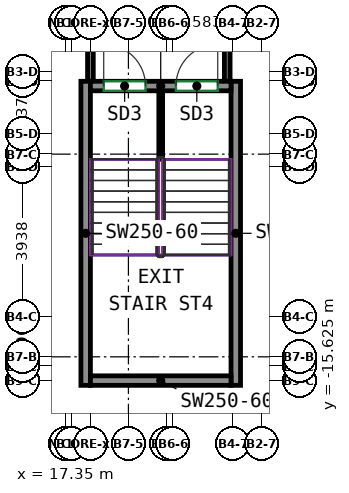
"""IFC4 building model, lengths in metres.
Left out: names, types, materials, properties, quantities, classifications, styles, units other than length and angle.
Written with IfcOpenShell. Run it as: python <this file> out.ifc"""

import sys

from ifc_helpers import new_model, si_unit, direction, frame, frame_2d, origin, place, context, subcontext, project, spatial, rectangle, extrude, source, transform, mapped, element, fill, save


model = new_model("IFC4")
c1 = context("Model", 3, precision=1e-05, world=origin(), true_north=direction((0.0, 1.0)))
c2 = subcontext(c1, "Body", "Model", "MODEL_VIEW")
j1 = project(units=[si_unit("LENGTHUNIT", "METRE"), si_unit("PLANEANGLEUNIT", "RADIAN")], contexts=[c1])
p1 = place(None, origin())
s1 = spatial("IfcSite", under=j1, at=p1, CompositionType="ELEMENT")
p2 = place(p1, origin())
s2 = spatial("IfcBuilding", under=s1, at=p2, CompositionType="ELEMENT")
p3 = place(p2, frame((0.0, 0.0, 223.7)))
s3 = spatial("IfcBuildingStorey", under=s2, at=p3, CompositionType="ELEMENT", Elevation=223.7)
m1 = source(origin(), c2, "Body", "SweptSolid", [
    extrude(rectangle(XDim=8.0, YDim=0.25, at=frame_2d((4.0, 0.0))), origin(), (0.0, 0.0, 1.0), 9.5),
])
for number, where, z_axis, x_axis in (
    (1, (17.875, -15.75, 0.0), (0.0, 0.0, 1.0), (0.0, 1.0, 0.0)),
    (2, (21.825, -15.75, 0.0), (0.0, 0.0, 1.0), (0.0, 1.0, 0.0)),
):
    element("IfcWall", number, at=place(p3, frame(where, z_axis=z_axis, x_axis=x_axis)), inside=s3, PredefinedType="SHEAR", context=c2, shape_type="MappedRepresentation", body=[
        mapped(m1, transform((0.0, 0.0, 0.0))),
    ])
m2 = source(origin(), c2, "Body", "SweptSolid", [
    extrude(rectangle(XDim=3.7, YDim=0.25, at=frame_2d((1.85, 0.0))), origin(), (0.0, 0.0, 1.0), 9.5),
])
p4 = place(p3, frame((18.0, -15.625, 0.0), z_axis=(0.0, 0.0, 1.0), x_axis=(1.0, 0.0, 0.0)))
e3 = element("IfcWall", 3, at=p4, inside=s3, PredefinedType="SHEAR", context=c2, shape_type="MappedRepresentation", body=[
    mapped(m2, transform((0.0, 0.0, 0.0))),
])
p5 = place(p3, frame((18.0, -7.875, 0.0), z_axis=(0.0, 0.0, 1.0), x_axis=(1.0, 0.0, 0.0)))
e4 = element("IfcWall", 4, at=p5, inside=s3, PredefinedType="SHEAR", context=c2, shape_type="MappedRepresentation", body=[
    mapped(m2, transform((0.0, 0.0, 0.0))),
])
p6 = place(p5, frame((2.25, 0.0, 0.0)))
e5 = element("IfcOpeningElement", 5, at=p6, cuts=e4, PredefinedType="OPENING", context=c2, shape_type="SweptSolid", body=[
    extrude(rectangle(XDim=1.1, YDim=2.1, at=frame_2d((0.55, 1.05))), frame((0.0, 0.135, 0.0), z_axis=(0.0, -1.0, 0.0), x_axis=(1.0, 0.0, 0.0)), (0.0, 0.0, 1.0), 0.27),
])
p7 = place(p5, frame((0.35, 0.0, 0.0)))
e6 = element("IfcOpeningElement", 6, at=p7, cuts=e4, PredefinedType="OPENING", context=c2, shape_type="SweptSolid", body=[
    extrude(rectangle(XDim=1.1, YDim=2.1, at=frame_2d((0.55, 1.05))), frame((0.0, 0.135, 0.0), z_axis=(0.0, -1.0, 0.0), x_axis=(1.0, 0.0, 0.0)), (0.0, 0.0, 1.0), 0.27),
])
m3 = source(origin(), c2, "Body", "SweptSolid", [
    extrude(rectangle(XDim=1.8, YDim=0.1, at=frame_2d((0.9, 0.0))), origin(), (0.0, 0.0, 1.0), 3.1),
])
p8 = place(p3, frame((19.85, -9.8, 0.0), z_axis=(0.0, 0.0, 1.0), x_axis=(0.0, 1.0, 0.0)))
e7 = element("IfcWall", 7, at=p8, inside=s3, PredefinedType="PARTITIONING", context=c2, shape_type="MappedRepresentation", body=[
    mapped(m3, transform((0.0, 0.0, 0.0))),
])
p9 = place(p3, frame((21.6, -7.75, 0.0), z_axis=(0.0, 0.0, 1.0), x_axis=(0.0, 1.0, 0.0)))
e8 = element("IfcWall", 8, at=p9, inside=s3, PredefinedType="PARTITIONING", context=c2, shape_type="SweptSolid", body=[
    extrude(rectangle(XDim=11.075, YDim=0.15, at=frame_2d((5.538, 0.0))), origin(), (0.0, 0.0, 1.0), 9.5),
])
p10 = place(p9, frame((3.932, 0.0, 0.0)))
e9 = element("IfcOpeningElement", 9, at=p10, cuts=e8, PredefinedType="OPENING", context=c2, shape_type="SweptSolid", body=[
    extrude(rectangle(XDim=1.8, YDim=2.1, at=frame_2d((0.9, 1.05))), frame((0.0, 0.085, 0.0), z_axis=(0.0, -1.0, 0.0), x_axis=(1.0, 0.0, 0.0)), (0.0, 0.0, 1.0), 0.17),
])
p11 = place(p3, frame((18.0, 3.125, 0.0), z_axis=(0.0, 0.0, 1.0), x_axis=(0.0, -1.0, 0.0)))
e10 = element("IfcWall", 10, at=p11, inside=s3, PredefinedType="PARTITIONING", context=c2, shape_type="SweptSolid", body=[
    extrude(rectangle(XDim=10.875, YDim=0.15, at=frame_2d((5.438, 0.0))), origin(), (0.0, 0.0, 1.0), 9.5),
])
p12 = place(p6, origin())
e11 = element("IfcDoor", 11, at=p12, inside=s3, OperationType="SINGLE_SWING_RIGHT", PredefinedType="DOOR", context=c2, shape_type="SweptSolid", body=[
    extrude(rectangle(XDim=1.1, YDim=2.1, at=frame_2d((0.55, 1.05))), frame((0.0, 0.025, 0.0), z_axis=(0.0, -1.0, 0.0), x_axis=(1.0, 0.0, 0.0)), (0.0, 0.0, 1.0), 0.05),
])
fill(e5, e11)
p13 = place(p7, origin())
e12 = element("IfcDoor", 12, at=p13, inside=s3, OperationType="SINGLE_SWING_LEFT", PredefinedType="DOOR", context=c2, shape_type="SweptSolid", body=[
    extrude(rectangle(XDim=1.1, YDim=2.1, at=frame_2d((0.55, 1.05))), frame((0.0, 0.025, 0.0), z_axis=(0.0, -1.0, 0.0), x_axis=(1.0, 0.0, 0.0)), (0.0, 0.0, 1.0), 0.05),
])
fill(e6, e12)
save(model, sys.argv[1])
